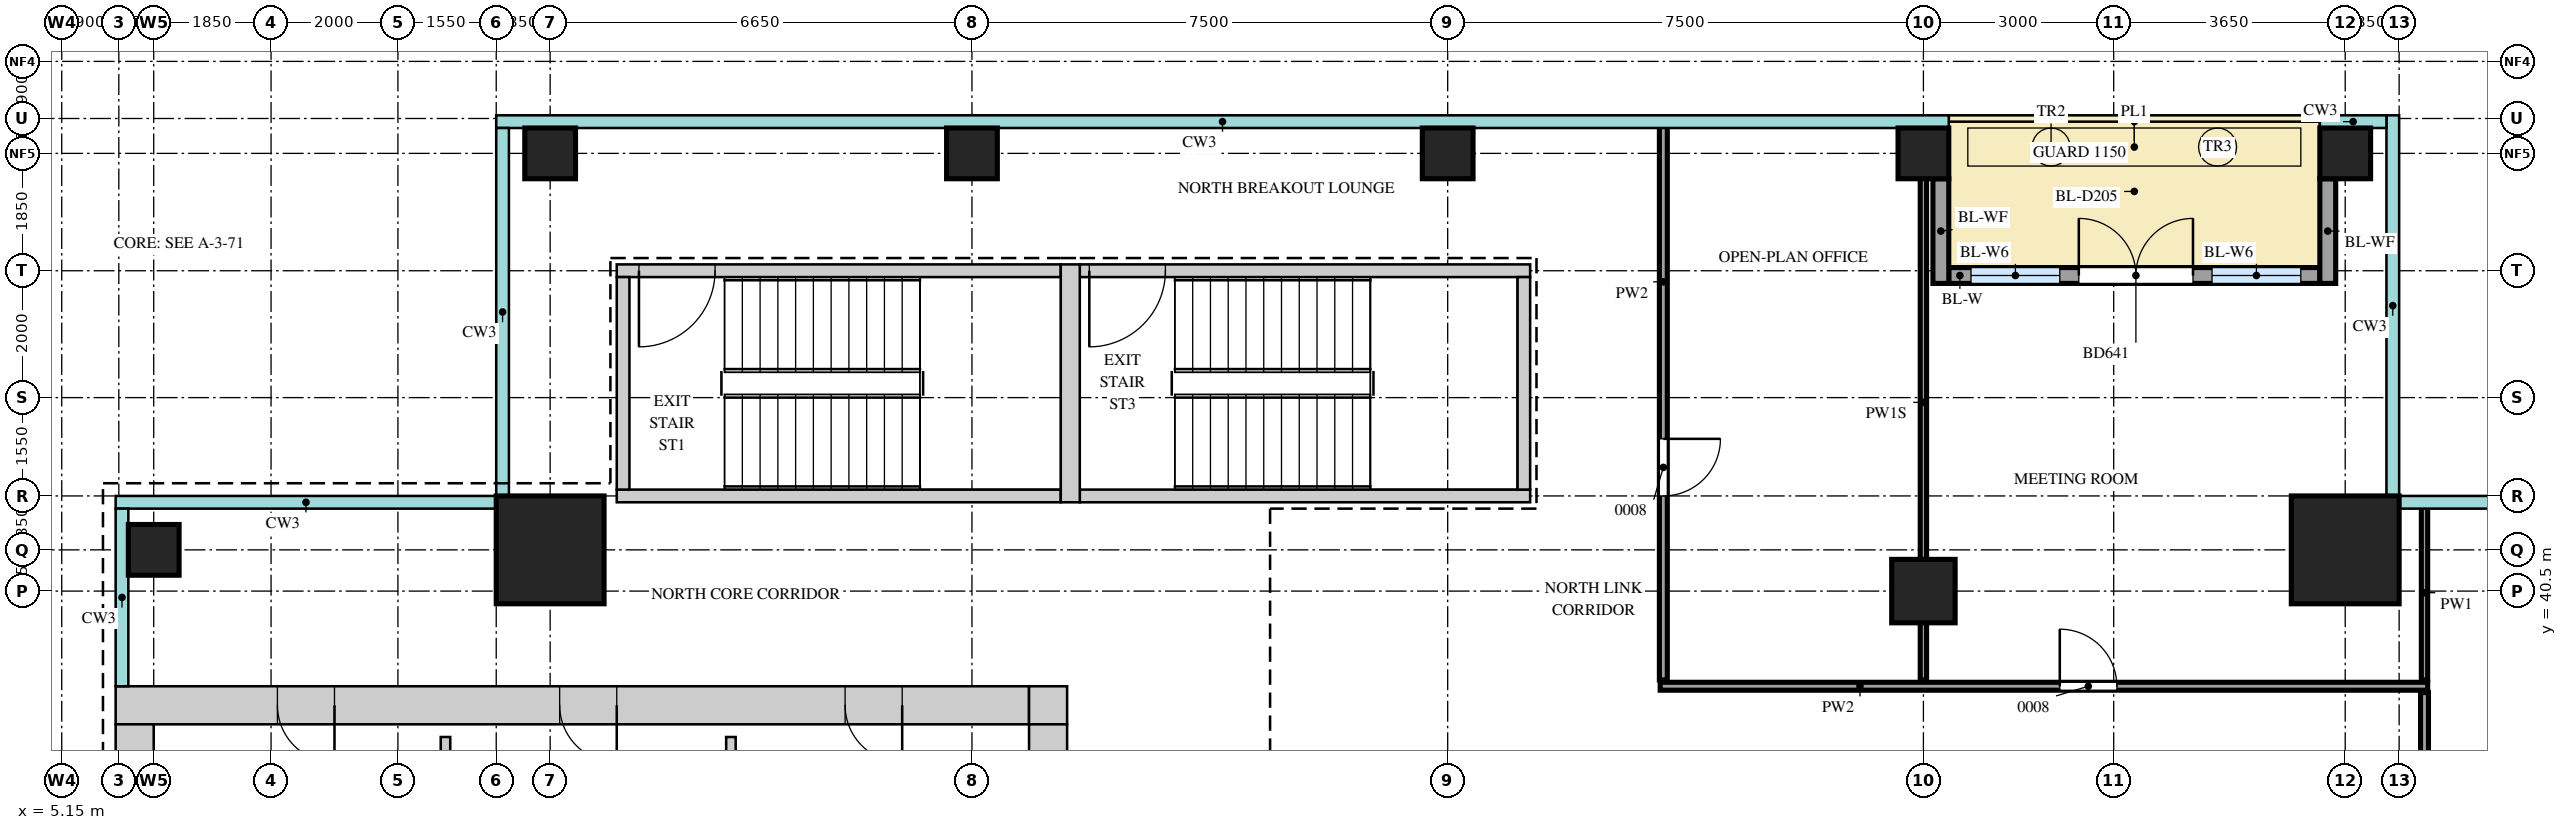
"""IFC4 building model, lengths in metres.
Left out: names, types, materials, properties, quantities, classifications, styles, units other than length and angle.
Written with IfcOpenShell. Run it as: python <this file> out.ifc"""

import sys

from ifc_helpers import new_model, si_unit, direction, frame, frame_2d, origin, origin_2d, place, context, subcontext, project, spatial, rectangle, extrude, source, transform, mapped, element, fill, save


model = new_model("IFC4")
c1 = context("Model", 3, precision=1e-05, world=origin(), true_north=direction((0.0, 1.0)))
c2 = subcontext(c1, "Body", "Model", "MODEL_VIEW")
j1 = project(units=[si_unit("LENGTHUNIT", "METRE"), si_unit("PLANEANGLEUNIT", "RADIAN")], contexts=[c1])
p1 = place(None, origin())
s1 = spatial("IfcSite", under=j1, at=p1, CompositionType="ELEMENT")
p2 = place(p1, origin())
s2 = spatial("IfcBuilding", under=s1, at=p2, CompositionType="ELEMENT")
p3 = place(p2, frame((0.0, 0.0, 286.2)))
s3 = spatial("IfcBuildingStorey", under=s2, at=p3, CompositionType="ELEMENT", Elevation=286.2)
m1 = source(origin(), c2, "Body", "SweptSolid", [
    extrude(rectangle(XDim=14.4, YDim=0.6, at=frame_2d((7.2, 0.0))), origin(), (0.0, 0.0, 1.0), 3.75),
])
p4 = place(p3, frame((6.0, 38.7, 0.0), z_axis=(0.0, 0.0, 1.0), x_axis=(1.0, 0.0, 0.0)))
e1 = element("IfcWall", 1, at=p4, inside=s3, PredefinedType="SHEAR", context=c2, shape_type="MappedRepresentation", body=[
    mapped(m1, transform((0.0, 0.0, 0.0))),
])
m2 = source(origin(), c2, "Body", "SweptSolid", [
    extrude(rectangle(XDim=0.9, YDim=2.1, at=frame_2d((0.45, 1.05))), frame((0.0, 0.31, 0.0), z_axis=(0.0, -1.0, 0.0), x_axis=(1.0, 0.0, 0.0)), (0.0, 0.0, 1.0), 0.62),
])
p5 = place(p4, frame((2.55, 0.0, 0.0)))
e2 = element("IfcOpeningElement", 2, at=p5, cuts=e1, PredefinedType="OPENING", context=c2, shape_type="MappedRepresentation", body=[
    mapped(m2, transform((0.0, 0.0, 0.0))),
])
p6 = place(p4, frame((7.0, 0.0, 0.0)))
e3 = element("IfcOpeningElement", 3, at=p6, cuts=e1, PredefinedType="OPENING", context=c2, shape_type="MappedRepresentation", body=[
    mapped(m2, transform((0.0, 0.0, 0.0))),
])
p7 = place(p4, frame((11.5, 0.0, 0.0)))
e4 = element("IfcOpeningElement", 4, at=p7, cuts=e1, PredefinedType="OPENING", context=c2, shape_type="MappedRepresentation", body=[
    mapped(m2, transform((0.0, 0.0, 0.0))),
])
m3 = source(origin(), c2, "Body", "SweptSolid", [
    extrude(rectangle(XDim=0.6, YDim=0.6, at=frame_2d((0.3, 0.0))), origin(), (0.0, 0.0, 1.0), 3.75),
])
p8 = place(p3, frame((20.4, 38.7, 0.0), z_axis=(0.0, 0.0, 1.0), x_axis=(1.0, 0.0, 0.0)))
e5 = element("IfcWall", 5, at=p8, inside=s3, PredefinedType="SHEAR", context=c2, shape_type="MappedRepresentation", body=[
    mapped(m3, transform((0.0, 0.0, 0.0))),
])
m4 = source(origin(), c2, "Body", "SweptSolid", [
    extrude(rectangle(XDim=22.8, YDim=0.6, at=frame_2d((11.4, 0.0))), origin(), (0.0, 0.0, 1.0), 3.75),
])
p9 = place(p3, frame((20.7, 15.6, 0.0), z_axis=(0.0, 0.0, 1.0), x_axis=(0.0, 1.0, 0.0)))
e6 = element("IfcWall", 6, at=p9, inside=s3, PredefinedType="SHEAR", context=c2, shape_type="MappedRepresentation", body=[
    mapped(m4, transform((0.0, 0.0, 0.0))),
])
m5 = source(origin(), c2, "Body", "SweptSolid", [
    extrude(rectangle(XDim=1.8, YDim=2.1, at=frame_2d((0.9, 1.05))), frame((0.0, 0.31, 0.0), z_axis=(0.0, -1.0, 0.0), x_axis=(1.0, 0.0, 0.0)), (0.0, 0.0, 1.0), 0.62),
])
p10 = place(p9, frame((10.9, 0.0, 0.0)))
e7 = element("IfcOpeningElement", 7, at=p10, cuts=e6, PredefinedType="OPENING", context=c2, shape_type="MappedRepresentation", body=[
    mapped(m5, transform((0.0, 0.0, 0.0))),
])
p11 = place(p9, frame((0.55, 0.0, 0.0)))
e8 = element("IfcOpeningElement", 8, at=p11, cuts=e6, PredefinedType="OPENING", context=c2, shape_type="MappedRepresentation", body=[
    mapped(m2, transform((0.0, 0.0, 0.0))),
])
m6 = source(origin(), c2, "Body", "SweptSolid", [
    extrude(rectangle(XDim=1.0, YDim=2.1, at=frame_2d((0.5, 1.05))), frame((0.0, 0.31, 0.0), z_axis=(0.0, -1.0, 0.0), x_axis=(1.0, 0.0, 0.0)), (0.0, 0.0, 1.0), 0.62),
])
p12 = place(p9, frame((2.3, 0.0, 0.0)))
e9 = element("IfcOpeningElement", 9, at=p12, cuts=e6, PredefinedType="OPENING", context=c2, shape_type="MappedRepresentation", body=[
    mapped(m6, transform((0.0, 0.0, 0.0))),
])
p13 = place(p9, frame((5.1, 0.0, 0.0)))
e10 = element("IfcOpeningElement", 10, at=p13, cuts=e6, PredefinedType="OPENING", context=c2, shape_type="MappedRepresentation", body=[
    mapped(m2, transform((0.0, 0.0, 0.0))),
])
p14 = place(p3, frame((6.3, 15.6, 0.0), z_axis=(0.0, 0.0, 1.0), x_axis=(0.0, 1.0, 0.0)))
e11 = element("IfcWall", 11, at=p14, inside=s3, PredefinedType="SHEAR", context=c2, shape_type="MappedRepresentation", body=[
    mapped(m4, transform((0.0, 0.0, 0.0))),
])
m7 = source(origin(), c2, "Body", "SweptSolid", [
    extrude(rectangle(XDim=7.0, YDim=0.2, at=frame_2d((3.5, 0.0))), origin(), (0.0, 0.0, 1.0), 3.75),
])
p15 = place(p3, frame((13.9, 45.55, 0.0), z_axis=(0.0, 0.0, 1.0), x_axis=(1.0, 0.0, 0.0)))
e12 = element("IfcWall", 12, at=p15, inside=s3, PredefinedType="SHEAR", context=c2, shape_type="MappedRepresentation", body=[
    mapped(m7, transform((0.0, 0.0, 0.0))),
])
m8 = source(origin(), c2, "Body", "SweptSolid", [
    extrude(rectangle(XDim=1.2, YDim=2.1, at=frame_2d((0.6, 1.05))), frame((0.0, 0.11, 0.0), z_axis=(0.0, -1.0, 0.0), x_axis=(1.0, 0.0, 0.0)), (0.0, 0.0, 1.0), 0.22),
])
p16 = place(p15, frame((0.35, 0.0, 0.0)))
e13 = element("IfcOpeningElement", 13, at=p16, cuts=e12, PredefinedType="OPENING", context=c2, shape_type="MappedRepresentation", body=[
    mapped(m8, transform((0.0, 0.0, 0.0))),
])
p17 = place(p3, frame((13.9, 42.0, 0.0), z_axis=(0.0, 0.0, 1.0), x_axis=(1.0, 0.0, 0.0)))
e14 = element("IfcWall", 14, at=p17, inside=s3, PredefinedType="SHEAR", context=c2, shape_type="MappedRepresentation", body=[
    mapped(m7, transform((0.0, 0.0, 0.0))),
])
m9 = source(origin(), c2, "Body", "SweptSolid", [
    extrude(rectangle(XDim=7.1, YDim=0.2, at=frame_2d((3.55, 0.0))), origin(), (0.0, 0.0, 1.0), 3.75),
])
p18 = place(p3, frame((21.2, 45.55, 0.0), z_axis=(0.0, 0.0, 1.0), x_axis=(1.0, 0.0, 0.0)))
e15 = element("IfcWall", 15, at=p18, inside=s3, PredefinedType="SHEAR", context=c2, shape_type="MappedRepresentation", body=[
    mapped(m9, transform((0.0, 0.0, 0.0))),
])
p19 = place(p18, frame((0.15, 0.0, 0.0)))
e16 = element("IfcOpeningElement", 16, at=p19, cuts=e15, PredefinedType="OPENING", context=c2, shape_type="MappedRepresentation", body=[
    mapped(m8, transform((0.0, 0.0, 0.0))),
])
p20 = place(p3, frame((21.2, 42.0, 0.0), z_axis=(0.0, 0.0, 1.0), x_axis=(1.0, 0.0, 0.0)))
e17 = element("IfcWall", 17, at=p20, inside=s3, PredefinedType="SHEAR", context=c2, shape_type="MappedRepresentation", body=[
    mapped(m9, transform((0.0, 0.0, 0.0))),
])
m10 = source(origin(), c2, "Body", "SweptSolid", [
    extrude(rectangle(XDim=3.75, YDim=0.3, at=frame_2d((1.875, 0.0))), origin(), (0.0, 0.0, 1.0), 3.75),
])
p21 = place(p3, frame((21.05, 41.9, 0.0), z_axis=(0.0, 0.0, 1.0), x_axis=(0.0, 1.0, 0.0)))
e18 = element("IfcWall", 18, at=p21, inside=s3, PredefinedType="SHEAR", context=c2, shape_type="MappedRepresentation", body=[
    mapped(m10, transform((0.0, 0.0, 0.0))),
])
m11 = source(origin(), c2, "Body", "SweptSolid", [
    extrude(rectangle(XDim=3.35, YDim=0.2, at=frame_2d((1.675, 0.0))), origin(), (0.0, 0.0, 1.0), 3.75),
])
for number, where, z_axis, x_axis in (
    (19, (14.0, 42.1, 0.0), (0.0, 0.0, 1.0), (0.0, 1.0, 0.0)),
    (20, (28.2, 42.1, 0.0), (0.0, 0.0, 1.0), (0.0, 1.0, 0.0)),
):
    element("IfcWall", number, at=place(p3, frame(where, z_axis=z_axis, x_axis=x_axis)), inside=s3, PredefinedType="SHEAR", context=c2, shape_type="MappedRepresentation", body=[
        mapped(m11, transform((0.0, 0.0, 0.0))),
    ])
m12 = source(origin(), c2, "Body", "SweptSolid", [
    extrude(rectangle(XDim=1.7, YDim=1.7, at=origin_2d()), origin(), (0.0, 0.0, 1.0), 3.75),
])
for number, where, z_axis, x_axis in (
    (21, (41.15, 41.15, 0.0), (0.0, 0.0, 1.0), (1.0, 0.0, 0.0)),
    (22, (12.85, 41.15, 0.0), (0.0, 0.0, 1.0), (1.0, 0.0, 0.0)),
):
    element("IfcColumn", number, at=place(p3, frame(where, z_axis=z_axis, x_axis=x_axis)), inside=s3, PredefinedType="COLUMN", context=c2, shape_type="MappedRepresentation", body=[
        mapped(m12, transform((0.0, 0.0, 0.0))),
    ])
m13 = source(origin(), c2, "Body", "SweptSolid", [
    extrude(rectangle(XDim=0.8, YDim=0.8, at=origin_2d()), origin(), (0.0, 0.0, 1.0), 3.75),
])
for number, where, z_axis, x_axis in (
    (23, (12.85, 47.4, 0.0), (0.0, 0.0, 1.0), (1.0, 0.0, 0.0)),
    (24, (19.5, 47.4, 0.0), (0.0, 0.0, 1.0), (1.0, 0.0, 0.0)),
    (25, (27.0, 47.4, 0.0), (0.0, 0.0, 1.0), (1.0, 0.0, 0.0)),
    (26, (34.5, 47.4, 0.0), (0.0, 0.0, 1.0), (1.0, 0.0, 0.0)),
    (27, (41.15, 47.4, 0.0), (0.0, 0.0, 1.0), (1.0, 0.0, 0.0)),
    (28, (6.6, 41.15, 0.0), (0.0, 0.0, 1.0), (1.0, 0.0, 0.0)),
):
    element("IfcColumn", number, at=place(p3, frame(where, z_axis=z_axis, x_axis=x_axis)), inside=s3, PredefinedType="COLUMN", context=c2, shape_type="MappedRepresentation", body=[
        mapped(m13, transform((0.0, 0.0, 0.0))),
    ])
m14 = source(origin(), c2, "Body", "SweptSolid", [
    extrude(rectangle(XDim=1.0, YDim=1.0, at=origin_2d()), origin(), (0.0, 0.0, 1.0), 3.75),
])
p22 = place(p3, frame((34.5, 40.5, 0.0), z_axis=(0.0, 0.0, 1.0), x_axis=(1.0, 0.0, 0.0)))
e29 = element("IfcColumn", 29, at=p22, inside=s3, PredefinedType="COLUMN", context=c2, shape_type="MappedRepresentation", body=[
    mapped(m14, transform((0.0, 0.0, 0.0))),
])
m15 = source(origin(), c2, "Body", "SweptSolid", [
    extrude(rectangle(XDim=5.85, YDim=0.25, at=frame_2d((2.925, 0.0))), origin(), (0.0, 0.0, 1.0), 3.75),
])
p23 = place(p3, frame((34.9, 45.475, 0.0), z_axis=(0.0, 0.0, 1.0), x_axis=(1.0, 0.0, 0.0)))
e30 = element("IfcWall", 30, at=p23, inside=s3, PredefinedType="SOLIDWALL", context=c2, shape_type="MappedRepresentation", body=[
    mapped(m15, transform((0.0, 0.0, 0.0))),
])
m16 = source(origin(), c2, "Body", "SweptSolid", [
    extrude(rectangle(XDim=1.4, YDim=2.4, at=frame_2d((0.7, 1.2))), frame((0.0, 0.135, 0.0), z_axis=(0.0, -1.0, 0.0), x_axis=(1.0, 0.0, 0.0)), (0.0, 0.0, 1.0), 0.27),
])
p24 = place(p23, frame((0.35, 0.0, 0.0)))
e31 = element("IfcOpeningElement", 31, at=p24, cuts=e30, PredefinedType="OPENING", context=c2, shape_type="MappedRepresentation", body=[
    mapped(m16, transform((0.0, 0.0, 0.0))),
])
p25 = place(p23, frame((4.15, 0.0, 0.0)))
e32 = element("IfcOpeningElement", 32, at=p25, cuts=e30, PredefinedType="OPENING", context=c2, shape_type="MappedRepresentation", body=[
    mapped(m16, transform((0.0, 0.0, 0.0))),
])
m17 = source(origin(), c2, "Body", "SweptSolid", [
    extrude(rectangle(XDim=1.8, YDim=2.4, at=frame_2d((0.9, 1.2))), frame((0.0, 0.135, 0.0), z_axis=(0.0, -1.0, 0.0), x_axis=(1.0, 0.0, 0.0)), (0.0, 0.0, 1.0), 0.27),
])
p26 = place(p23, frame((2.05, 0.0, 0.0)))
e33 = element("IfcOpeningElement", 33, at=p26, cuts=e30, PredefinedType="OPENING", context=c2, shape_type="MappedRepresentation", body=[
    mapped(m17, transform((0.0, 0.0, 0.0))),
])
m18 = source(origin(), c2, "Body", "SweptSolid", [
    extrude(rectangle(XDim=1.65, YDim=0.25, at=frame_2d((0.825, 0.0))), origin(), (0.0, 0.0, 1.0), 3.45),
])
for number, where, z_axis, x_axis in (
    (34, (34.775, 47.0, 0.0), (0.0, 0.0, 1.0), (0.0, -1.0, 0.0)),
    (35, (40.875, 47.0, 0.0), (0.0, 0.0, 1.0), (0.0, -1.0, 0.0)),
):
    element("IfcWall", number, at=place(p3, frame(where, z_axis=z_axis, x_axis=x_axis)), inside=s3, PredefinedType="SOLIDWALL", context=c2, shape_type="MappedRepresentation", body=[
        mapped(m18, transform((0.0, 0.0, 0.0))),
    ])
m19 = source(origin(), c2, "Body", "SweptSolid", [
    extrude(rectangle(XDim=23.8, YDim=0.125, at=frame_2d((11.9, 0.0))), origin(), (0.0, 0.0, 1.0), 3.8),
])
p27 = place(p3, frame((42.4, 15.1, 0.0), z_axis=(0.0, 0.0, 1.0), x_axis=(0.0, 1.0, 0.0)))
e36 = element("IfcWall", 36, at=p27, inside=s3, PredefinedType="PARTITIONING", context=c2, shape_type="MappedRepresentation", body=[
    mapped(m19, transform((0.0, 0.0, 0.0))),
])
m20 = source(origin(), c2, "Body", "SweptSolid", [
    extrude(rectangle(XDim=0.9, YDim=2.1, at=frame_2d((0.45, 1.05))), frame((0.0, 0.073, 0.0), z_axis=(0.0, -1.0, 0.0), x_axis=(1.0, 0.0, 0.0)), (0.0, 0.0, 1.0), 0.145),
])
p28 = place(p27, frame((5.3, 0.0, 0.0)))
e37 = element("IfcOpeningElement", 37, at=p28, cuts=e36, PredefinedType="OPENING", context=c2, shape_type="MappedRepresentation", body=[
    mapped(m20, transform((0.0, 0.0, 0.0))),
])
p29 = place(p27, frame((15.35, 0.0, 0.0)))
e38 = element("IfcOpeningElement", 38, at=p29, cuts=e36, PredefinedType="OPENING", context=c2, shape_type="MappedRepresentation", body=[
    mapped(m20, transform((0.0, 0.0, 0.0))),
])
p30 = place(p27, frame((21.05, 0.0, 0.0)))
e39 = element("IfcOpeningElement", 39, at=p30, cuts=e36, PredefinedType="OPENING", context=c2, shape_type="MappedRepresentation", body=[
    mapped(m20, transform((0.0, 0.0, 0.0))),
])
m21 = source(origin(), c2, "Body", "SweptSolid", [
    extrude(rectangle(XDim=6.0, YDim=0.15, at=frame_2d((3.0, 0.0))), origin(), (0.0, 0.0, 1.0), 3.8),
])
p31 = place(p3, frame((11.2, 32.2, 0.0), z_axis=(0.0, 0.0, 1.0), x_axis=(0.0, 1.0, 0.0)))
e40 = element("IfcWall", 40, at=p31, inside=s3, PredefinedType="PARTITIONING", context=c2, shape_type="MappedRepresentation", body=[
    mapped(m21, transform((0.0, 0.0, 0.0))),
])
m22 = source(origin(), c2, "Body", "SweptSolid", [
    extrude(rectangle(XDim=5.9, YDim=0.15, at=frame_2d((2.95, 0.0))), origin(), (0.0, 0.0, 1.0), 3.8),
])
p32 = place(p3, frame((15.7, 32.3, 0.0), z_axis=(0.0, 0.0, 1.0), x_axis=(0.0, 1.0, 0.0)))
e41 = element("IfcWall", 41, at=p32, inside=s3, PredefinedType="PARTITIONING", context=c2, shape_type="MappedRepresentation", body=[
    mapped(m22, transform((0.0, 0.0, 0.0))),
])
m23 = source(origin(), c2, "Body", "SweptSolid", [
    extrude(rectangle(XDim=12.1, YDim=0.125, at=frame_2d((6.05, 0.0))), origin(), (0.0, 0.0, 1.0), 3.8),
])
p33 = place(p3, frame((30.35, 39.0, 0.0), z_axis=(0.0, 0.0, 1.0), x_axis=(1.0, 0.0, 0.0)))
e42 = element("IfcWall", 42, at=p33, inside=s3, PredefinedType="PARTITIONING", context=c2, shape_type="MappedRepresentation", body=[
    mapped(m23, transform((0.0, 0.0, 0.0))),
])
p34 = place(p33, frame((6.3, 0.0, 0.0)))
e43 = element("IfcOpeningElement", 43, at=p34, cuts=e42, PredefinedType="OPENING", context=c2, shape_type="MappedRepresentation", body=[
    mapped(m20, transform((0.0, 0.0, 0.0))),
])
m24 = source(origin(), c2, "Body", "SweptSolid", [
    extrude(rectangle(XDim=8.75, YDim=0.125, at=frame_2d((4.375, 0.0))), origin(), (0.0, 0.0, 1.0), 3.8),
])
p35 = place(p3, frame((30.4, 39.1, 0.0), z_axis=(0.0, 0.0, 1.0), x_axis=(0.0, 1.0, 0.0)))
e44 = element("IfcWall", 44, at=p35, inside=s3, PredefinedType="PARTITIONING", context=c2, shape_type="MappedRepresentation", body=[
    mapped(m24, transform((0.0, 0.0, 0.0))),
])
p36 = place(p35, frame((2.9, 0.0, 0.0)))
e45 = element("IfcOpeningElement", 45, at=p36, cuts=e44, PredefinedType="OPENING", context=c2, shape_type="MappedRepresentation", body=[
    mapped(m20, transform((0.0, 0.0, 0.0))),
])
m25 = source(origin(), c2, "Body", "SweptSolid", [
    extrude(rectangle(XDim=8.75, YDim=0.1, at=frame_2d((4.375, 0.0))), origin(), (0.0, 0.0, 1.0), 3.35),
])
p37 = place(p3, frame((34.5, 39.1, 0.0), z_axis=(0.0, 0.0, 1.0), x_axis=(0.0, 1.0, 0.0)))
e46 = element("IfcWall", 46, at=p37, inside=s3, PredefinedType="PARTITIONING", context=c2, shape_type="MappedRepresentation", body=[
    mapped(m25, transform((0.0, 0.0, 0.0))),
])
m26 = source(origin(), c2, "Body", "SweptSolid", [
    extrude(rectangle(XDim=2.75, YDim=0.1, at=frame_2d((1.375, 0.0))), origin(), (0.0, 0.0, 1.0), 3.8),
])
p38 = place(p3, frame((42.4, 39.1, 0.0), z_axis=(0.0, 0.0, 1.0), x_axis=(0.0, 1.0, 0.0)))
e47 = element("IfcWall", 47, at=p38, inside=s3, PredefinedType="PARTITIONING", context=c2, shape_type="MappedRepresentation", body=[
    mapped(m26, transform((0.0, 0.0, 0.0))),
])
m27 = source(origin(), c2, "Body", "SweptSolid", [
    extrude(rectangle(XDim=1.4, YDim=2.4, at=frame_2d((0.7, 1.2))), frame((0.0, 0.03, 0.0), z_axis=(0.0, -1.0, 0.0), x_axis=(1.0, 0.0, 0.0)), (0.0, 0.0, 1.0), 0.06),
])
p39 = place(p24, origin())
e48 = element("IfcWindow", 48, at=p39, inside=s3, PartitioningType="SINGLE_PANEL", PredefinedType="WINDOW", context=c2, shape_type="MappedRepresentation", body=[
    mapped(m27, transform((0.0, 0.0, 0.0))),
])
fill(e31, e48)
p40 = place(p25, origin())
e49 = element("IfcWindow", 49, at=p40, inside=s3, PartitioningType="SINGLE_PANEL", PredefinedType="WINDOW", context=c2, shape_type="MappedRepresentation", body=[
    mapped(m27, transform((0.0, 0.0, 0.0))),
])
fill(e32, e49)
m28 = source(origin(), c2, "Body", "SweptSolid", [
    extrude(rectangle(XDim=1.8, YDim=2.4, at=frame_2d((0.9, 1.2))), frame((0.0, 0.025, 0.0), z_axis=(0.0, -1.0, 0.0), x_axis=(1.0, 0.0, 0.0)), (0.0, 0.0, 1.0), 0.05),
])
p41 = place(p26, origin())
e50 = element("IfcDoor", 50, at=p41, inside=s3, OperationType="DOUBLE_DOOR_DOUBLE_SWING", PredefinedType="DOOR", context=c2, shape_type="MappedRepresentation", body=[
    mapped(m28, transform((0.0, 0.0, 0.0))),
])
fill(e33, e50)
m29 = source(origin(), c2, "Body", "SweptSolid", [
    extrude(rectangle(XDim=0.9, YDim=2.1, at=frame_2d((0.45, 1.05))), frame((0.0, 0.25, 0.0), z_axis=(0.0, -1.0, 0.0), x_axis=(1.0, 0.0, 0.0)), (0.0, 0.0, 1.0), 0.5),
])
p42 = place(p5, origin())
e51 = element("IfcDoor", 51, at=p42, inside=s3, OperationType="SINGLE_SWING_RIGHT", PredefinedType="DOOR", context=c2, shape_type="MappedRepresentation", body=[
    mapped(m29, transform((0.0, 0.0, 0.0))),
])
fill(e2, e51)
p43 = place(p6, origin())
e52 = element("IfcDoor", 52, at=p43, inside=s3, OperationType="SINGLE_SWING_RIGHT", PredefinedType="DOOR", context=c2, shape_type="MappedRepresentation", body=[
    mapped(m29, transform((0.0, 0.0, 0.0))),
])
fill(e3, e52)
p44 = place(p7, origin())
e53 = element("IfcDoor", 53, at=p44, inside=s3, OperationType="SINGLE_SWING_RIGHT", PredefinedType="DOOR", context=c2, shape_type="MappedRepresentation", body=[
    mapped(m29, transform((0.0, 0.0, 0.0))),
])
fill(e4, e53)
m30 = source(origin(), c2, "Body", "SweptSolid", [
    extrude(rectangle(XDim=0.9, YDim=2.1, at=frame_2d((0.45, 1.05))), frame((0.0, 0.025, 0.0), z_axis=(0.0, -1.0, 0.0), x_axis=(1.0, 0.0, 0.0)), (0.0, 0.0, 1.0), 0.05),
])
p45 = place(p36, origin())
e54 = element("IfcDoor", 54, at=p45, inside=s3, OperationType="SINGLE_SWING_RIGHT", PredefinedType="DOOR", context=c2, shape_type="MappedRepresentation", body=[
    mapped(m30, transform((0.0, 0.0, 0.0))),
])
fill(e45, e54)
p46 = place(p34, origin())
e55 = element("IfcDoor", 55, at=p46, inside=s3, OperationType="SINGLE_SWING_RIGHT", PredefinedType="DOOR", context=c2, shape_type="MappedRepresentation", body=[
    mapped(m30, transform((0.0, 0.0, 0.0))),
])
fill(e43, e55)
m31 = source(origin(), c2, "Body", "SweptSolid", [
    extrude(rectangle(XDim=1.2, YDim=2.1, at=frame_2d((0.6, 1.05))), frame((0.0, 0.025, 0.0), z_axis=(0.0, -1.0, 0.0), x_axis=(1.0, 0.0, 0.0)), (0.0, 0.0, 1.0), 0.05),
])
p47 = place(p16, origin())
e56 = element("IfcDoor", 56, at=p47, inside=s3, OperationType="SINGLE_SWING_LEFT", PredefinedType="DOOR", context=c2, shape_type="MappedRepresentation", body=[
    mapped(m31, transform((0.0, 0.0, 0.0))),
])
fill(e13, e56)
p48 = place(p19, origin())
e57 = element("IfcDoor", 57, at=p48, inside=s3, OperationType="SINGLE_SWING_LEFT", PredefinedType="DOOR", context=c2, shape_type="MappedRepresentation", body=[
    mapped(m31, transform((0.0, 0.0, 0.0))),
])
fill(e16, e57)
save(model, sys.argv[1])
